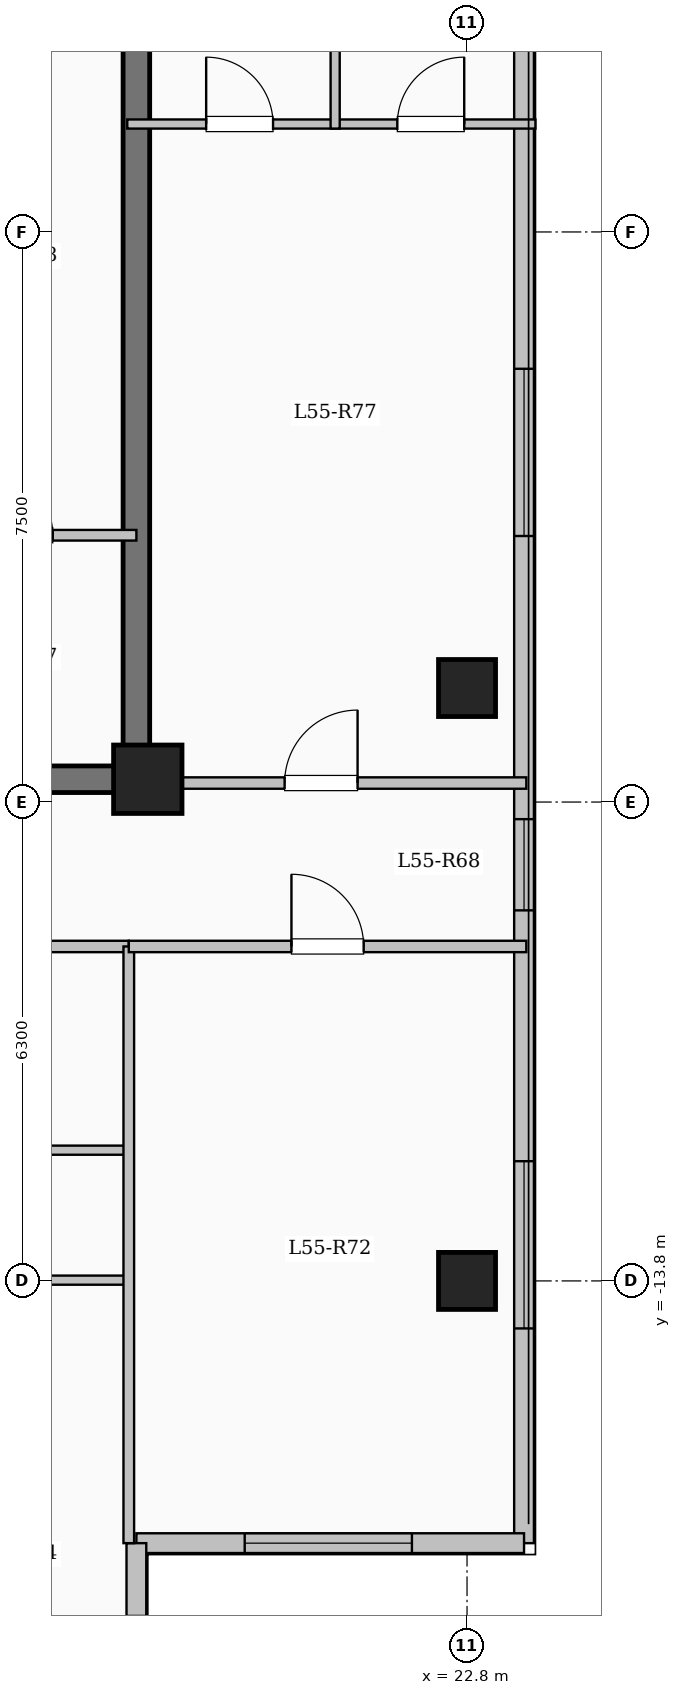
"""IFC4 building model, lengths in metres.
Left out: names, types, materials, properties, quantities, classifications, styles, units other than length and angle.
Written with IfcOpenShell. Run it as: python <this file> out.ifc"""

import sys

from ifc_helpers import new_model, si_unit, direction, frame, frame_2d, origin, origin_2d, place, context, subcontext, project, spatial, rectangle, extrude, element, fill, save


model = new_model("IFC4")
c1 = context("Model", 3, precision=1e-05, world=origin(), true_north=direction((0.0, 1.0)))
c2 = subcontext(c1, "Body", "Model", "MODEL_VIEW")
j1 = project(units=[si_unit("LENGTHUNIT", "METRE"), si_unit("PLANEANGLEUNIT", "RADIAN")], contexts=[c1])
p1 = place(None, origin())
s1 = spatial("IfcSite", under=j1, at=p1, CompositionType="ELEMENT")
p2 = place(p1, origin())
s2 = spatial("IfcBuilding", under=s1, at=p2, CompositionType="ELEMENT")
p3 = place(p2, frame((0.0, 0.0, 203.65)))
s3 = spatial("IfcBuildingStorey", under=s2, at=p3, CompositionType="ELEMENT", Elevation=203.65)
p4 = place(p3, frame((18.6, -7.2, 0.0), z_axis=(0.0, 0.0, 1.0), x_axis=(1.0, 0.0, 0.0)))
e1 = element("IfcColumn", 1, at=p4, inside=s3, PredefinedType="COLUMN", context=c2, shape_type="SweptSolid", body=[
    extrude(rectangle(XDim=0.9, YDim=0.9, at=origin_2d()), origin(), (0.0, 0.0, 1.0), 3.35),
])
for number, where, z_axis, x_axis in (
    (2, (22.8, -13.8, 0.0), (0.0, 0.0, 1.0), (1.0, 0.0, 0.0)),
    (3, (22.8, -6.0, 0.0), (0.0, 0.0, 1.0), (1.0, 0.0, 0.0)),
):
    element("IfcColumn", number, at=place(p3, frame(where, z_axis=z_axis, x_axis=x_axis)), inside=s3, PredefinedType="COLUMN", context=c2, shape_type="SweptSolid", body=[
        extrude(rectangle(XDim=0.75, YDim=0.75, at=origin_2d()), origin(), (0.0, 0.0, 1.0), 3.35),
    ])
p5 = place(p3, frame((23.55, 17.25, 0.0), z_axis=(0.0, 0.0, 1.0), x_axis=(0.0, -1.0, 0.0)))
e4 = element("IfcWall", 4, at=p5, inside=s3, PredefinedType="SOLIDWALL", context=c2, shape_type="SweptSolid", body=[
    extrude(rectangle(XDim=34.5, YDim=0.26, at=frame_2d((17.25, 0.0))), origin(), (0.0, 0.0, 1.0), 3.1),
])
p6 = place(p5, frame((1.375, 0.0, 0.9)))
e5 = element("IfcOpeningElement", 5, at=p6, cuts=e4, PredefinedType="OPENING", context=c2, shape_type="SweptSolid", body=[
    extrude(rectangle(XDim=2.0, YDim=1.7, at=frame_2d((1.0, 0.85))), frame((0.0, 0.14, 0.0), z_axis=(0.0, -1.0, 0.0), x_axis=(1.0, 0.0, 0.0)), (0.0, 0.0, 1.0), 0.28),
])
p7 = place(p5, frame((5.125, 0.0, 0.95)))
e6 = element("IfcOpeningElement", 6, at=p7, cuts=e4, PredefinedType="OPENING", context=c2, shape_type="SweptSolid", body=[
    extrude(rectangle(XDim=1.0, YDim=1.5, at=frame_2d((0.5, 0.75))), frame((0.0, 0.14, 0.0), z_axis=(0.0, -1.0, 0.0), x_axis=(1.0, 0.0, 0.0)), (0.0, 0.0, 1.0), 0.28),
])
p8 = place(p5, frame((8.375, 0.0, 0.9)))
e7 = element("IfcOpeningElement", 7, at=p8, cuts=e4, PredefinedType="OPENING", context=c2, shape_type="SweptSolid", body=[
    extrude(rectangle(XDim=2.0, YDim=1.7, at=frame_2d((1.0, 0.85))), frame((0.0, 0.14, 0.0), z_axis=(0.0, -1.0, 0.0), x_axis=(1.0, 0.0, 0.0)), (0.0, 0.0, 1.0), 0.28),
])
p9 = place(p5, frame((13.2, 0.0, 0.9)))
e8 = element("IfcOpeningElement", 8, at=p9, cuts=e4, PredefinedType="OPENING", context=c2, shape_type="SweptSolid", body=[
    extrude(rectangle(XDim=1.65, YDim=1.6, at=frame_2d((0.825, 0.8))), frame((0.0, 0.14, 0.0), z_axis=(0.0, -1.0, 0.0), x_axis=(1.0, 0.0, 0.0)), (0.0, 0.0, 1.0), 0.28),
])
p10 = place(p5, frame((19.05, 0.0, 0.9)))
e9 = element("IfcOpeningElement", 9, at=p10, cuts=e4, PredefinedType="OPENING", context=c2, shape_type="SweptSolid", body=[
    extrude(rectangle(XDim=2.2, YDim=1.75, at=frame_2d((1.1, 0.875))), frame((0.0, 0.14, 0.0), z_axis=(0.0, -1.0, 0.0), x_axis=(1.0, 0.0, 0.0)), (0.0, 0.0, 1.0), 0.28),
])
p11 = place(p5, frame((24.975, 0.0, 0.95)))
e10 = element("IfcOpeningElement", 10, at=p11, cuts=e4, PredefinedType="OPENING", context=c2, shape_type="SweptSolid", body=[
    extrude(rectangle(XDim=1.2, YDim=1.5, at=frame_2d((0.6, 0.75))), frame((0.0, 0.14, 0.0), z_axis=(0.0, -1.0, 0.0), x_axis=(1.0, 0.0, 0.0)), (0.0, 0.0, 1.0), 0.28),
])
p12 = place(p5, frame((29.475, 0.0, 0.9)))
e11 = element("IfcOpeningElement", 11, at=p12, cuts=e4, PredefinedType="OPENING", context=c2, shape_type="SweptSolid", body=[
    extrude(rectangle(XDim=2.2, YDim=1.75, at=frame_2d((1.1, 0.875))), frame((0.0, 0.14, 0.0), z_axis=(0.0, -1.0, 0.0), x_axis=(1.0, 0.0, 0.0)), (0.0, 0.0, 1.0), 0.28),
])
p13 = place(p3, frame((23.55, -17.25, 0.0), z_axis=(0.0, 0.0, 1.0), x_axis=(-1.0, 0.0, 0.0)))
e12 = element("IfcWall", 12, at=p13, inside=s3, PredefinedType="SOLIDWALL", context=c2, shape_type="SweptSolid", body=[
    extrude(rectangle(XDim=5.1, YDim=0.26, at=frame_2d((2.55, 0.0))), origin(), (0.0, 0.0, 1.0), 3.1),
])
p14 = place(p13, frame((1.475, 0.0, 0.9)))
e13 = element("IfcOpeningElement", 13, at=p14, cuts=e12, PredefinedType="OPENING", context=c2, shape_type="SweptSolid", body=[
    extrude(rectangle(XDim=2.2, YDim=1.75, at=frame_2d((1.1, 0.875))), frame((0.0, 0.14, 0.0), z_axis=(0.0, -1.0, 0.0), x_axis=(1.0, 0.0, 0.0)), (0.0, 0.0, 1.0), 0.28),
])
p15 = place(p3, frame((18.45, -17.25, 0.0), z_axis=(0.0, 0.0, 1.0), x_axis=(0.0, -1.0, 0.0)))
e14 = element("IfcWall", 14, at=p15, inside=s3, PredefinedType="SOLIDWALL", context=c2, shape_type="SweptSolid", body=[
    extrude(rectangle(XDim=3.6, YDim=0.26, at=frame_2d((1.8, 0.0))), origin(), (0.0, 0.0, 1.0), 3.1),
])
p16 = place(p15, frame((0.958, 0.0, 0.9)))
e15 = element("IfcOpeningElement", 15, at=p16, cuts=e14, PredefinedType="OPENING", context=c2, shape_type="SweptSolid", body=[
    extrude(rectangle(XDim=1.65, YDim=1.6, at=frame_2d((0.825, 0.8))), frame((0.0, 0.14, 0.0), z_axis=(0.0, -1.0, 0.0), x_axis=(1.0, 0.0, 0.0)), (0.0, 0.0, 1.0), 0.28),
])
p17 = place(p3, frame((18.45, -7.375, 0.0), z_axis=(0.0, 0.0, 1.0), x_axis=(0.0, 1.0, 0.0)))
e16 = element("IfcWall", 16, at=p17, inside=s3, PredefinedType="SHEAR", context=c2, shape_type="SweptSolid", body=[
    extrude(rectangle(XDim=14.05, YDim=0.35, at=frame_2d((7.025, 0.0))), origin(), (0.0, 0.0, 1.0), 3.35),
])
p18 = place(p3, frame((12.625, -7.2, 0.0), z_axis=(0.0, 0.0, 1.0), x_axis=(1.0, 0.0, 0.0)))
e17 = element("IfcWall", 17, at=p18, inside=s3, PredefinedType="SHEAR", context=c2, shape_type="SweptSolid", body=[
    extrude(rectangle(XDim=6.0, YDim=0.35, at=frame_2d((3.0, 0.0))), origin(), (0.0, 0.0, 1.0), 3.35),
])
p19 = place(p3, frame((15.4, -3.99, 0.0), z_axis=(0.0, 0.0, 1.0), x_axis=(1.0, 0.0, 0.0)))
e18 = element("IfcWall", 18, at=p19, inside=s3, PredefinedType="PARTITIONING", context=c2, shape_type="SweptSolid", body=[
    extrude(rectangle(XDim=3.05, YDim=0.14, at=frame_2d((1.525, 0.0))), origin(), (0.0, 0.0, 1.0), 3.1),
])
p20 = place(p19, frame((1.05, 0.0, 0.0)))
e19 = element("IfcOpeningElement", 19, at=p20, cuts=e18, PredefinedType="OPENING", context=c2, shape_type="SweptSolid", body=[
    extrude(rectangle(XDim=0.9, YDim=2.08, at=frame_2d((0.45, 1.04))), frame((0.0, 0.08, 0.0), z_axis=(0.0, -1.0, 0.0), x_axis=(1.0, 0.0, 0.0)), (0.0, 0.0, 1.0), 0.16),
])
p21 = place(p3, frame((8.55, -9.4, 0.0), z_axis=(0.0, 0.0, 1.0), x_axis=(1.0, 0.0, 0.0)))
e20 = element("IfcWall", 20, at=p21, inside=s3, PredefinedType="PARTITIONING", context=c2, shape_type="SweptSolid", body=[
    extrude(rectangle(XDim=9.8, YDim=0.15, at=frame_2d((4.9, 0.0))), origin(), (0.0, 0.0, 1.0), 3.1),
])
p22 = place(p21, frame((0.9, 0.0, 0.0)))
e21 = element("IfcOpeningElement", 21, at=p22, cuts=e20, PredefinedType="OPENING", context=c2, shape_type="SweptSolid", body=[
    extrude(rectangle(XDim=0.96, YDim=2.15, at=frame_2d((0.48, 1.075))), frame((0.0, 0.085, 0.0), z_axis=(0.0, -1.0, 0.0), x_axis=(1.0, 0.0, 0.0)), (0.0, 0.0, 1.0), 0.17),
])
p23 = place(p3, frame((15.343, -12.08, 0.0), z_axis=(0.0, 0.0, 1.0), x_axis=(1.0, 0.0, 0.0)))
e22 = element("IfcWall", 22, at=p23, inside=s3, PredefinedType="PARTITIONING", context=c2, shape_type="SweptSolid", body=[
    extrude(rectangle(XDim=3.007, YDim=0.12, at=frame_2d((1.503, 0.0))), origin(), (0.0, 0.0, 1.0), 3.1),
])
p24 = place(p23, frame((1.064, 0.0, 0.0)))
e23 = element("IfcOpeningElement", 23, at=p24, cuts=e22, PredefinedType="OPENING", context=c2, shape_type="SweptSolid", body=[
    extrude(rectangle(XDim=0.88, YDim=2.1, at=frame_2d((0.44, 1.05))), frame((0.0, 0.07, 0.0), z_axis=(0.0, -1.0, 0.0), x_axis=(1.0, 0.0, 0.0)), (0.0, 0.0, 1.0), 0.14),
])
p25 = place(p3, frame((12.452, -13.79, 0.0), z_axis=(0.0, 0.0, 1.0), x_axis=(1.0, 0.0, 0.0)))
e24 = element("IfcWall", 24, at=p25, inside=s3, PredefinedType="PARTITIONING", context=c2, shape_type="SweptSolid", body=[
    extrude(rectangle(XDim=5.958, YDim=0.12, at=frame_2d((2.979, 0.0))), origin(), (0.0, 0.0, 1.0), 2.725),
])
p26 = place(p25, frame((1.005, 0.0, 0.0)))
e25 = element("IfcOpeningElement", 25, at=p26, cuts=e24, PredefinedType="OPENING", context=c2, shape_type="SweptSolid", body=[
    extrude(rectangle(XDim=0.88, YDim=2.1, at=frame_2d((0.44, 1.05))), frame((0.0, 0.07, 0.0), z_axis=(0.0, -1.0, 0.0), x_axis=(1.0, 0.0, 0.0)), (0.0, 0.0, 1.0), 0.14),
])
p27 = place(p25, frame((3.894, 0.0, 0.0)))
e26 = element("IfcOpeningElement", 26, at=p27, cuts=e24, PredefinedType="OPENING", context=c2, shape_type="SweptSolid", body=[
    extrude(rectangle(XDim=0.88, YDim=2.1, at=frame_2d((0.44, 1.05))), frame((0.0, 0.07, 0.0), z_axis=(0.0, -1.0, 0.0), x_axis=(1.0, 0.0, 0.0)), (0.0, 0.0, 1.0), 0.14),
])
p28 = place(p3, frame((18.45, -7.25, 0.0), z_axis=(0.0, 0.0, 1.0), x_axis=(1.0, 0.0, 0.0)))
e27 = element("IfcWall", 27, at=p28, inside=s3, PredefinedType="PARTITIONING", context=c2, shape_type="SweptSolid", body=[
    extrude(rectangle(XDim=5.13, YDim=0.15, at=frame_2d((2.565, 0.0))), origin(), (0.0, 0.0, 1.0), 3.1),
])
p29 = place(p28, frame((1.95, 0.0, 0.0)))
e28 = element("IfcOpeningElement", 28, at=p29, cuts=e27, PredefinedType="OPENING", context=c2, shape_type="SweptSolid", body=[
    extrude(rectangle(XDim=0.96, YDim=2.15, at=frame_2d((0.48, 1.075))), frame((0.0, 0.085, 0.0), z_axis=(0.0, -1.0, 0.0), x_axis=(1.0, 0.0, 0.0)), (0.0, 0.0, 1.0), 0.17),
])
p30 = place(p3, frame((18.35, -17.25, 0.0), z_axis=(0.0, 0.0, 1.0), x_axis=(0.0, 1.0, 0.0)))
e29 = element("IfcWall", 29, at=p30, inside=s3, PredefinedType="PARTITIONING", context=c2, shape_type="SweptSolid", body=[
    extrude(rectangle(XDim=7.85, YDim=0.14, at=frame_2d((3.925, 0.0))), origin(), (0.0, 0.0, 1.0), 3.1),
])
p31 = place(p3, frame((18.35, -9.4, 0.0), z_axis=(0.0, 0.0, 1.0), x_axis=(1.0, 0.0, 0.0)))
e30 = element("IfcWall", 30, at=p31, inside=s3, PredefinedType="PARTITIONING", context=c2, shape_type="SweptSolid", body=[
    extrude(rectangle(XDim=5.23, YDim=0.15, at=frame_2d((2.615, 0.0))), origin(), (0.0, 0.0, 1.0), 3.1),
])
p32 = place(p31, frame((2.14, 0.0, 0.0)))
e31 = element("IfcOpeningElement", 31, at=p32, cuts=e30, PredefinedType="OPENING", context=c2, shape_type="SweptSolid", body=[
    extrude(rectangle(XDim=0.95, YDim=2.15, at=frame_2d((0.475, 1.075))), frame((0.0, 0.085, 0.0), z_axis=(0.0, -1.0, 0.0), x_axis=(1.0, 0.0, 0.0)), (0.0, 0.0, 1.0), 0.17),
])
p33 = place(p3, frame((18.33, 1.42, 0.0), z_axis=(0.0, 0.0, 1.0), x_axis=(1.0, 0.0, 0.0)))
e32 = element("IfcWall", 32, at=p33, inside=s3, PredefinedType="PARTITIONING", context=c2, shape_type="SweptSolid", body=[
    extrude(rectangle(XDim=5.37, YDim=0.12, at=frame_2d((2.685, 0.0))), origin(), (0.0, 0.0, 1.0), 3.1),
])
p34 = place(p33, frame((1.038, 0.0, 0.0)))
e33 = element("IfcOpeningElement", 33, at=p34, cuts=e32, PredefinedType="OPENING", context=c2, shape_type="SweptSolid", body=[
    extrude(rectangle(XDim=0.88, YDim=2.1, at=frame_2d((0.44, 1.05))), frame((0.0, 0.07, 0.0), z_axis=(0.0, -1.0, 0.0), x_axis=(1.0, 0.0, 0.0)), (0.0, 0.0, 1.0), 0.14),
])
p35 = place(p33, frame((3.553, 0.0, 0.0)))
e34 = element("IfcOpeningElement", 34, at=p35, cuts=e32, PredefinedType="OPENING", context=c2, shape_type="SweptSolid", body=[
    extrude(rectangle(XDim=0.88, YDim=2.1, at=frame_2d((0.44, 1.05))), frame((0.0, 0.07, 0.0), z_axis=(0.0, -1.0, 0.0), x_axis=(1.0, 0.0, 0.0)), (0.0, 0.0, 1.0), 0.14),
])
p36 = place(p3, frame((21.065, 1.36, 0.0), z_axis=(0.0, 0.0, 1.0), x_axis=(0.0, 1.0, 0.0)))
e35 = element("IfcWall", 35, at=p36, inside=s3, PredefinedType="PARTITIONING", context=c2, shape_type="SweptSolid", body=[
    extrude(rectangle(XDim=3.58, YDim=0.12, at=frame_2d((1.79, 0.0))), origin(), (0.0, 0.0, 1.0), 3.1),
])
p37 = place(p10, origin())
e36 = element("IfcWindow", 36, at=p37, inside=s3, PartitioningType="SINGLE_PANEL", PredefinedType="WINDOW", context=c2, shape_type="SweptSolid", body=[
    extrude(rectangle(XDim=2.2, YDim=1.75, at=frame_2d((1.1, 0.875))), frame((0.0, 0.03, 0.0), z_axis=(0.0, -1.0, 0.0), x_axis=(1.0, 0.0, 0.0)), (0.0, 0.0, 1.0), 0.06),
])
fill(e9, e36)
p38 = place(p11, origin())
e37 = element("IfcWindow", 37, at=p38, inside=s3, PartitioningType="SINGLE_PANEL", PredefinedType="WINDOW", context=c2, shape_type="SweptSolid", body=[
    extrude(rectangle(XDim=1.2, YDim=1.5, at=frame_2d((0.6, 0.75))), frame((0.0, 0.03, 0.0), z_axis=(0.0, -1.0, 0.0), x_axis=(1.0, 0.0, 0.0)), (0.0, 0.0, 1.0), 0.06),
])
fill(e10, e37)
p39 = place(p12, origin())
e38 = element("IfcWindow", 38, at=p39, inside=s3, PartitioningType="SINGLE_PANEL", PredefinedType="WINDOW", context=c2, shape_type="SweptSolid", body=[
    extrude(rectangle(XDim=2.2, YDim=1.75, at=frame_2d((1.1, 0.875))), frame((0.0, 0.03, 0.0), z_axis=(0.0, -1.0, 0.0), x_axis=(1.0, 0.0, 0.0)), (0.0, 0.0, 1.0), 0.06),
])
fill(e11, e38)
p40 = place(p14, origin())
e39 = element("IfcWindow", 39, at=p40, inside=s3, PartitioningType="SINGLE_PANEL", PredefinedType="WINDOW", context=c2, shape_type="SweptSolid", body=[
    extrude(rectangle(XDim=2.2, YDim=1.75, at=frame_2d((1.1, 0.875))), frame((0.0, 0.03, 0.0), z_axis=(0.0, -1.0, 0.0), x_axis=(1.0, 0.0, 0.0)), (0.0, 0.0, 1.0), 0.06),
])
fill(e13, e39)
p41 = place(p32, origin())
e40 = element("IfcDoor", 40, at=p41, inside=s3, OperationType="SINGLE_SWING_LEFT", PredefinedType="DOOR", context=c2, shape_type="SweptSolid", body=[
    extrude(rectangle(XDim=0.95, YDim=2.15, at=frame_2d((0.475, 1.075))), frame((0.0, 0.025, 0.0), z_axis=(0.0, -1.0, 0.0), x_axis=(1.0, 0.0, 0.0)), (0.0, 0.0, 1.0), 0.05),
])
fill(e31, e40)
p42 = place(p29, origin())
e41 = element("IfcDoor", 41, at=p42, inside=s3, OperationType="SINGLE_SWING_RIGHT", PredefinedType="DOOR", context=c2, shape_type="SweptSolid", body=[
    extrude(rectangle(XDim=0.96, YDim=2.15, at=frame_2d((0.48, 1.075))), frame((0.0, 0.025, 0.0), z_axis=(0.0, -1.0, 0.0), x_axis=(1.0, 0.0, 0.0)), (0.0, 0.0, 1.0), 0.05),
])
fill(e28, e41)
p43 = place(p34, origin())
e42 = element("IfcDoor", 42, at=p43, inside=s3, OperationType="SINGLE_SWING_LEFT", PredefinedType="DOOR", context=c2, shape_type="SweptSolid", body=[
    extrude(rectangle(XDim=0.88, YDim=2.1, at=frame_2d((0.44, 1.05))), frame((0.0, 0.025, 0.0), z_axis=(0.0, -1.0, 0.0), x_axis=(1.0, 0.0, 0.0)), (0.0, 0.0, 1.0), 0.05),
])
fill(e33, e42)
p44 = place(p35, origin())
e43 = element("IfcDoor", 43, at=p44, inside=s3, OperationType="SINGLE_SWING_RIGHT", PredefinedType="DOOR", context=c2, shape_type="SweptSolid", body=[
    extrude(rectangle(XDim=0.88, YDim=2.1, at=frame_2d((0.44, 1.05))), frame((0.0, 0.025, 0.0), z_axis=(0.0, -1.0, 0.0), x_axis=(1.0, 0.0, 0.0)), (0.0, 0.0, 1.0), 0.05),
])
fill(e34, e43)
save(model, sys.argv[1])
